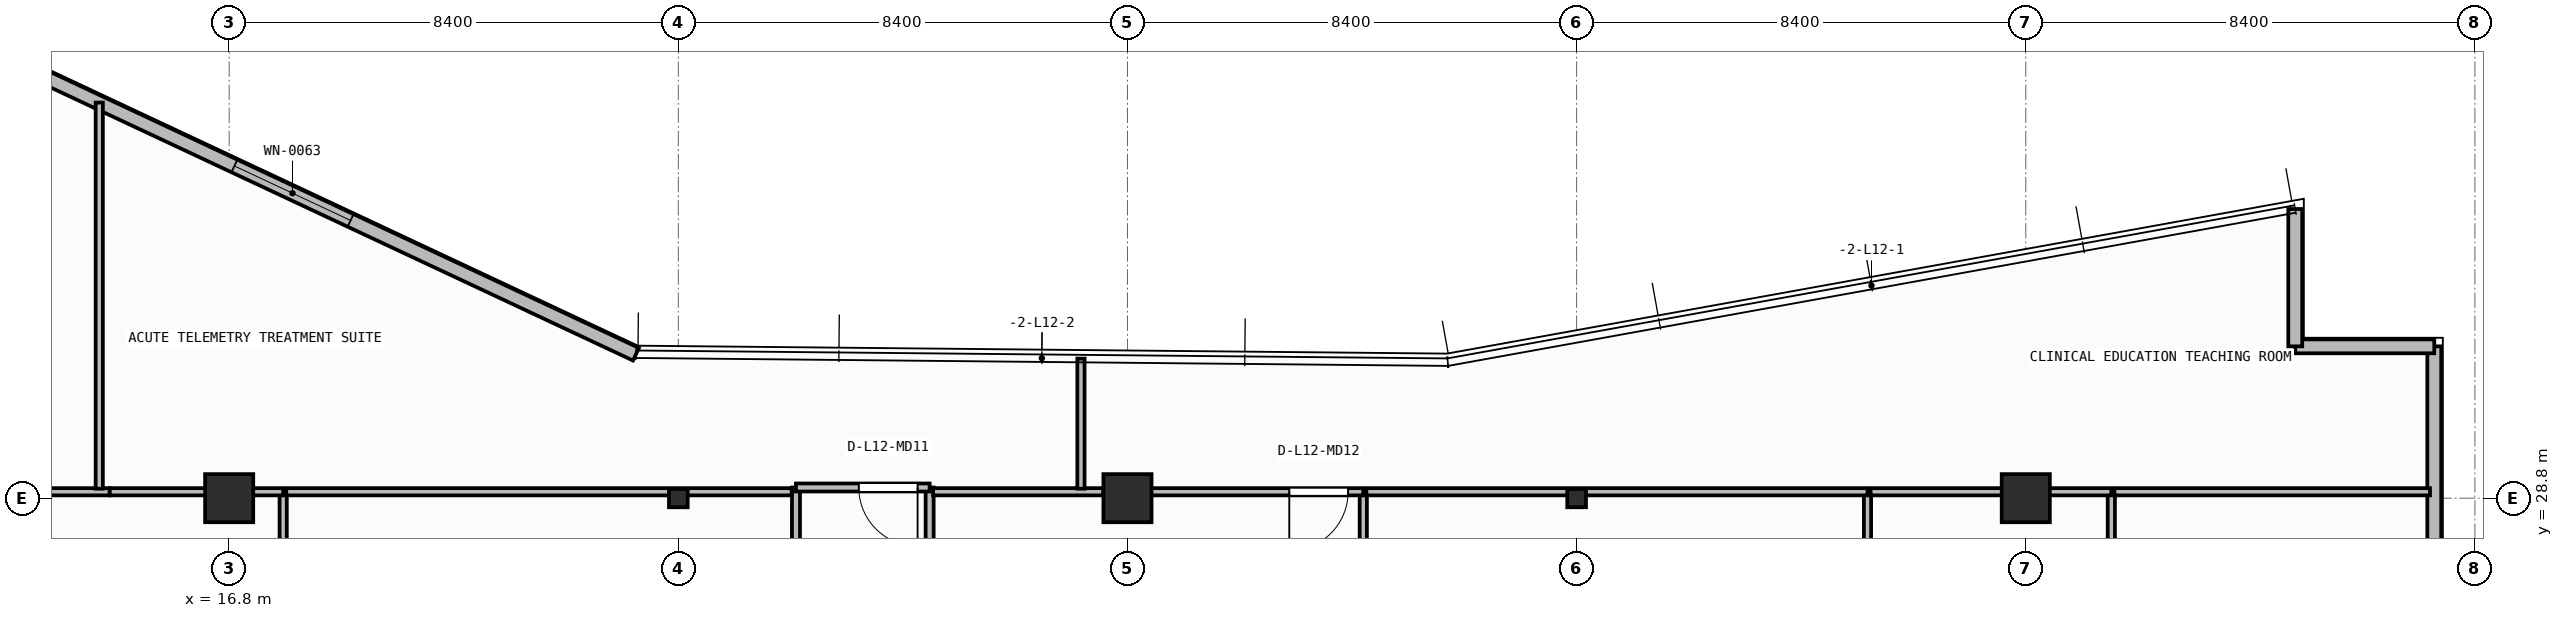
"""IFC4 building model, lengths in metres.
Left out: names, types, materials, properties, quantities, classifications, styles, units other than length and angle.
Written with IfcOpenShell. Run it as: python <this file> out.ifc"""

import sys

from ifc_helpers import new_model, si_unit, direction, frame, frame_2d, origin, origin_2d, place, context, subcontext, project, spatial, rectangle, i_section, extrude, element, fill, save


model = new_model("IFC4")
c1 = context("Model", 3, precision=1e-05, world=origin(), true_north=direction((0.0, 1.0)))
c2 = subcontext(c1, "Body", "Model", "MODEL_VIEW")
j1 = project(units=[si_unit("LENGTHUNIT", "METRE"), si_unit("PLANEANGLEUNIT", "RADIAN")], contexts=[c1])
p1 = place(None, origin())
s1 = spatial("IfcSite", under=j1, at=p1, CompositionType="ELEMENT")
p2 = place(p1, origin())
s2 = spatial("IfcBuilding", under=s1, at=p2, CompositionType="ELEMENT")
p3 = place(p2, frame((0.0, 0.0, 50.15)))
s3 = spatial("IfcBuildingStorey", under=s2, at=p3, CompositionType="ELEMENT", Elevation=50.15)
p4 = place(p3, frame((16.8, 28.8, 0.0), z_axis=(0.0, 0.0, 1.0), x_axis=(1.0, 0.0, 0.0)))
e1 = element("IfcColumn", 1, at=p4, inside=s3, PredefinedType="COLUMN", context=c2, shape_type="SweptSolid", body=[
    extrude(rectangle(XDim=0.9, YDim=0.9, at=origin_2d()), origin(), (0.0, 0.0, 1.0), 3.95),
])
p5 = place(p3, frame((25.2, 28.8, 0.0), z_axis=(0.0, 0.0, 1.0), x_axis=(1.0, 0.0, 0.0)))
e2 = element("IfcColumn", 2, at=p5, inside=s3, PredefinedType="COLUMN", context=c2, shape_type="SweptSolid", body=[
    extrude(i_section(OverallWidth=0.35, OverallDepth=0.34, WebThickness=0.016, FlangeThickness=0.028, at=origin_2d()), origin(), (0.0, 0.0, 1.0), 3.95),
])
p6 = place(p3, frame((33.6, 28.8, 0.0), z_axis=(0.0, 0.0, 1.0), x_axis=(1.0, 0.0, 0.0)))
e3 = element("IfcColumn", 3, at=p6, inside=s3, PredefinedType="COLUMN", context=c2, shape_type="SweptSolid", body=[
    extrude(rectangle(XDim=0.9, YDim=0.9, at=origin_2d()), origin(), (0.0, 0.0, 1.0), 3.95),
])
p7 = place(p3, frame((42.0, 28.8, 0.0), z_axis=(0.0, 0.0, 1.0), x_axis=(1.0, 0.0, 0.0)))
e4 = element("IfcColumn", 4, at=p7, inside=s3, PredefinedType="COLUMN", context=c2, shape_type="SweptSolid", body=[
    extrude(i_section(OverallWidth=0.35, OverallDepth=0.34, WebThickness=0.016, FlangeThickness=0.028, at=origin_2d()), origin(), (0.0, 0.0, 1.0), 3.95),
])
p8 = place(p3, frame((50.4, 28.8, 0.0), z_axis=(0.0, 0.0, 1.0), x_axis=(1.0, 0.0, 0.0)))
e5 = element("IfcColumn", 5, at=p8, inside=s3, PredefinedType="COLUMN", context=c2, shape_type="SweptSolid", body=[
    extrude(rectangle(XDim=0.9, YDim=0.9, at=origin_2d()), origin(), (0.0, 0.0, 1.0), 3.95),
])
p9 = place(p3, frame((58.04, 7.16, 0.0), z_axis=(0.0, 0.0, 1.0), x_axis=(0.0, 1.0, 0.0)))
e6 = element("IfcWall", 6, at=p9, inside=s3, PredefinedType="STANDARD", context=c2, shape_type="SweptSolid", body=[
    extrude(rectangle(XDim=24.48, YDim=0.26, at=frame_2d((12.24, 0.0))), origin(), (0.0, 0.0, 1.0), 3.71),
])
p10 = place(p9, frame((8.87, 0.0, 0.0)))
e7 = element("IfcOpeningElement", 7, at=p10, cuts=e6, PredefinedType="OPENING", context=c2, shape_type="SweptSolid", body=[
    extrude(rectangle(XDim=1.3, YDim=2.15, at=frame_2d((0.65, 1.075))), frame((0.0, 0.14, 0.0), z_axis=(0.0, -1.0, 0.0), x_axis=(1.0, 0.0, 0.0)), (0.0, 0.0, 1.0), 0.28),
])
p11 = place(p3, frame((58.04, 31.64, 0.0), z_axis=(0.0, 0.0, 1.0), x_axis=(-1.0, 0.0, 0.0)))
e8 = element("IfcWall", 8, at=p11, inside=s3, PredefinedType="STANDARD", context=c2, shape_type="SweptSolid", body=[
    extrude(rectangle(XDim=2.6, YDim=0.26, at=frame_2d((1.3, 0.0))), origin(), (0.0, 0.0, 1.0), 3.71),
])
p12 = place(p3, frame((55.44, 31.64, 0.0), z_axis=(0.0, 0.0, 1.0), x_axis=(0.0, 1.0, 0.0)))
e9 = element("IfcWall", 9, at=p12, inside=s3, PredefinedType="STANDARD", context=c2, shape_type="SweptSolid", body=[
    extrude(rectangle(XDim=2.569, YDim=0.26, at=frame_2d((1.284, 0.0))), origin(), (0.0, 0.0, 1.0), 3.71),
])
p13 = place(p3, frame((24.408, 31.492, 0.0), z_axis=(0.0, 0.0, 1.0), x_axis=(-0.905396522918, 0.424566998585, 0.0)))
e10 = element("IfcWall", 10, at=p13, inside=s3, PredefinedType="STANDARD", context=c2, shape_type="SweptSolid", body=[
    extrude(rectangle(XDim=14.189, YDim=0.26, at=frame_2d((7.095, 0.0))), origin(), (0.0, 0.0, 1.0), 3.71),
])
p14 = place(p13, frame((5.895, 0.0, 0.9)))
e11 = element("IfcOpeningElement", 11, at=p14, cuts=e10, PredefinedType="OPENING", context=c2, shape_type="SweptSolid", body=[
    extrude(rectangle(XDim=2.4, YDim=1.65, at=frame_2d((1.2, 0.825))), frame((0.0, 0.14, 0.0), z_axis=(0.0, -1.0, 0.0), x_axis=(1.0, 0.0, 0.0)), (0.0, 0.0, 1.0), 0.28),
])
p15 = place(p3, frame((27.4, 29.0, 0.0), z_axis=(0.0, 0.0, 1.0), x_axis=(0.0, -1.0, 0.0)))
e12 = element("IfcWall", 12, at=p15, inside=s3, PredefinedType="PARTITIONING", context=c2, shape_type="SweptSolid", body=[
    extrude(rectangle(XDim=9.432, YDim=0.15, at=frame_2d((4.716, 0.0))), origin(), (0.0, 0.0, 1.0), 3.71),
])
p16 = place(p15, frame((3.769, 0.0, 0.0)))
e13 = element("IfcOpeningElement", 13, at=p16, cuts=e12, PredefinedType="OPENING", context=c2, shape_type="SweptSolid", body=[
    extrude(rectangle(XDim=1.1, YDim=2.1, at=frame_2d((0.55, 1.05))), frame((0.0, 0.085, 0.0), z_axis=(0.0, -1.0, 0.0), x_axis=(1.0, 0.0, 0.0)), (0.0, 0.0, 1.0), 0.17),
])
p17 = place(p3, frame((29.9, 19.568, 0.0), z_axis=(0.0, 0.0, 1.0), x_axis=(0.0, 1.0, 0.0)))
e14 = element("IfcWall", 14, at=p17, inside=s3, PredefinedType="PARTITIONING", context=c2, shape_type="SweptSolid", body=[
    extrude(rectangle(XDim=9.432, YDim=0.15, at=frame_2d((4.716, 0.0))), origin(), (0.0, 0.0, 1.0), 3.71),
])
p18 = place(p17, frame((4.166, 0.0, 0.0)))
e15 = element("IfcOpeningElement", 15, at=p18, cuts=e14, PredefinedType="OPENING", context=c2, shape_type="SweptSolid", body=[
    extrude(rectangle(XDim=1.1, YDim=2.1, at=frame_2d((0.55, 1.05))), frame((0.0, 0.085, 0.0), z_axis=(0.0, -1.0, 0.0), x_axis=(1.0, 0.0, 0.0)), (0.0, 0.0, 1.0), 0.17),
])
p19 = place(p3, frame((29.9, 29.0, 0.0), z_axis=(0.0, 0.0, 1.0), x_axis=(-1.0, 0.0, 0.0)))
e16 = element("IfcWall", 16, at=p19, inside=s3, PredefinedType="PARTITIONING", context=c2, shape_type="SweptSolid", body=[
    extrude(rectangle(XDim=2.5, YDim=0.15, at=frame_2d((1.25, 0.0))), origin(), (0.0, 0.0, 1.0), 3.279),
])
p20 = place(p19, frame((0.225, 0.0, 0.0)))
e17 = element("IfcOpeningElement", 17, at=p20, cuts=e16, PredefinedType="OPENING", context=c2, shape_type="SweptSolid", body=[
    extrude(rectangle(XDim=1.1, YDim=2.1, at=frame_2d((0.55, 1.05))), frame((0.0, 0.085, 0.0), z_axis=(0.0, -1.0, 0.0), x_axis=(1.0, 0.0, 0.0)), (0.0, 0.0, 1.0), 0.17),
])
p21 = place(p3, frame((17.81, 19.397, 0.0), z_axis=(0.0, 0.0, 1.0), x_axis=(0.0, 1.0, 0.0)))
e18 = element("IfcWall", 18, at=p21, inside=s3, PredefinedType="PARTITIONING", context=c2, shape_type="SweptSolid", body=[
    extrude(rectangle(XDim=9.522, YDim=0.135, at=frame_2d((4.761, 0.0))), origin(), (0.0, 0.0, 1.0), 3.71),
])
p22 = place(p3, frame((14.565, 28.92, 0.0), z_axis=(0.0, 0.0, 1.0), x_axis=(-1.0, 0.0, 0.0)))
e19 = element("IfcWall", 19, at=p22, inside=s3, PredefinedType="PARTITIONING", context=c2, shape_type="SweptSolid", body=[
    extrude(rectangle(XDim=2.877, YDim=0.135, at=frame_2d((1.438, 0.0))), origin(), (0.0, 0.0, 1.0), 3.073),
])
p23 = place(p3, frame((17.81, 28.92, 0.0), z_axis=(0.0, 0.0, 1.0), x_axis=(-1.0, 0.0, 0.0)))
e20 = element("IfcWall", 20, at=p23, inside=s3, PredefinedType="PARTITIONING", context=c2, shape_type="SweptSolid", body=[
    extrude(rectangle(XDim=3.243, YDim=0.135, at=frame_2d((1.622, 0.0))), origin(), (0.0, 0.0, 1.0), 3.073),
])
p24 = place(p3, frame((27.32, 28.92, 0.0), z_axis=(0.0, 0.0, 1.0), x_axis=(-1.0, 0.0, 0.0)))
e21 = element("IfcWall", 21, at=p24, inside=s3, PredefinedType="PARTITIONING", context=c2, shape_type="SweptSolid", body=[
    extrude(rectangle(XDim=9.453, YDim=0.135, at=frame_2d((4.726, 0.0))), origin(), (0.0, 0.0, 1.0), 3.073),
])
p25 = place(p3, frame((38.01, 19.397, 0.0), z_axis=(0.0, 0.0, 1.0), x_axis=(0.0, 1.0, 0.0)))
e22 = element("IfcWall", 22, at=p25, inside=s3, PredefinedType="PARTITIONING", context=c2, shape_type="SweptSolid", body=[
    extrude(rectangle(XDim=9.522, YDim=0.135, at=frame_2d((4.761, 0.0))), origin(), (0.0, 0.0, 1.0), 3.71),
])
p26 = place(p25, frame((4.211, 0.0, 0.0)))
e23 = element("IfcOpeningElement", 23, at=p26, cuts=e22, PredefinedType="OPENING", context=c2, shape_type="SweptSolid", body=[
    extrude(rectangle(XDim=1.1, YDim=2.1, at=frame_2d((0.55, 1.05))), frame((0.0, 0.077, 0.0), z_axis=(0.0, -1.0, 0.0), x_axis=(1.0, 0.0, 0.0)), (0.0, 0.0, 1.0), 0.155),
])
p27 = place(p3, frame((33.15, 28.92, 0.0), z_axis=(0.0, 0.0, 1.0), x_axis=(-1.0, 0.0, 0.0)))
e24 = element("IfcWall", 24, at=p27, inside=s3, PredefinedType="PARTITIONING", context=c2, shape_type="SweptSolid", body=[
    extrude(rectangle(XDim=3.185, YDim=0.135, at=frame_2d((1.592, 0.0))), origin(), (0.0, 0.0, 1.0), 3.279),
])
p28 = place(p3, frame((38.01, 28.92, 0.0), z_axis=(0.0, 0.0, 1.0), x_axis=(-1.0, 0.0, 0.0)))
e25 = element("IfcWall", 25, at=p28, inside=s3, PredefinedType="PARTITIONING", context=c2, shape_type="SweptSolid", body=[
    extrude(rectangle(XDim=4.858, YDim=0.135, at=frame_2d((2.429, 0.0))), origin(), (0.0, 0.0, 1.0), 3.279),
])
p29 = place(p28, frame((0.284, 0.0, 0.0)))
e26 = element("IfcOpeningElement", 26, at=p29, cuts=e25, PredefinedType="OPENING", context=c2, shape_type="SweptSolid", body=[
    extrude(rectangle(XDim=1.1, YDim=2.1, at=frame_2d((0.55, 1.05))), frame((0.0, 0.077, 0.0), z_axis=(0.0, -1.0, 0.0), x_axis=(1.0, 0.0, 0.0)), (0.0, 0.0, 1.0), 0.155),
])
p30 = place(p3, frame((47.44, 19.397, 0.0), z_axis=(0.0, 0.0, 1.0), x_axis=(0.0, 1.0, 0.0)))
e27 = element("IfcWall", 27, at=p30, inside=s3, PredefinedType="PARTITIONING", context=c2, shape_type="SweptSolid", body=[
    extrude(rectangle(XDim=9.522, YDim=0.135, at=frame_2d((4.761, 0.0))), origin(), (0.0, 0.0, 1.0), 3.71),
])
p31 = place(p30, frame((4.211, 0.0, 0.0)))
e28 = element("IfcOpeningElement", 28, at=p31, cuts=e27, PredefinedType="OPENING", context=c2, shape_type="SweptSolid", body=[
    extrude(rectangle(XDim=1.1, YDim=2.1, at=frame_2d((0.55, 1.05))), frame((0.0, 0.077, 0.0), z_axis=(0.0, -1.0, 0.0), x_axis=(1.0, 0.0, 0.0)), (0.0, 0.0, 1.0), 0.155),
])
p32 = place(p3, frame((47.44, 28.92, 0.0), z_axis=(0.0, 0.0, 1.0), x_axis=(-1.0, 0.0, 0.0)))
e29 = element("IfcWall", 29, at=p32, inside=s3, PredefinedType="PARTITIONING", context=c2, shape_type="SweptSolid", body=[
    extrude(rectangle(XDim=9.373, YDim=0.135, at=frame_2d((4.686, 0.0))), origin(), (0.0, 0.0, 1.0), 3.073),
])
p33 = place(p3, frame((52.0, 19.397, 0.0), z_axis=(0.0, 0.0, 1.0), x_axis=(0.0, 1.0, 0.0)))
e30 = element("IfcWall", 30, at=p33, inside=s3, PredefinedType="PARTITIONING", context=c2, shape_type="SweptSolid", body=[
    extrude(rectangle(XDim=9.522, YDim=0.135, at=frame_2d((4.761, 0.0))), origin(), (0.0, 0.0, 1.0), 3.71),
])
p34 = place(p33, frame((4.612, 0.0, 0.0)))
e31 = element("IfcOpeningElement", 31, at=p34, cuts=e30, PredefinedType="OPENING", context=c2, shape_type="SweptSolid", body=[
    extrude(rectangle(XDim=1.1, YDim=2.1, at=frame_2d((0.55, 1.05))), frame((0.0, 0.077, 0.0), z_axis=(0.0, -1.0, 0.0), x_axis=(1.0, 0.0, 0.0)), (0.0, 0.0, 1.0), 0.155),
])
p35 = place(p3, frame((52.0, 28.92, 0.0), z_axis=(0.0, 0.0, 1.0), x_axis=(-1.0, 0.0, 0.0)))
e32 = element("IfcWall", 32, at=p35, inside=s3, PredefinedType="PARTITIONING", context=c2, shape_type="SweptSolid", body=[
    extrude(rectangle(XDim=4.502, YDim=0.135, at=frame_2d((2.251, 0.0))), origin(), (0.0, 0.0, 1.0), 3.073),
])
p36 = place(p3, frame((57.96, 28.92, 0.0), z_axis=(0.0, 0.0, 1.0), x_axis=(-1.0, 0.0, 0.0)))
e33 = element("IfcWall", 33, at=p36, inside=s3, PredefinedType="PARTITIONING", context=c2, shape_type="SweptSolid", body=[
    extrude(rectangle(XDim=5.902, YDim=0.135, at=frame_2d((2.951, 0.0))), origin(), (0.0, 0.0, 1.0), 3.71),
])
p37 = place(p3, frame((14.37, 28.978, 0.0), z_axis=(0.0, 0.0, 1.0), x_axis=(0.0, 1.0, 0.0)))
e34 = element("IfcWall", 34, at=p37, inside=s3, PredefinedType="PARTITIONING", context=c2, shape_type="SweptSolid", body=[
    extrude(rectangle(XDim=7.222, YDim=0.135, at=frame_2d((3.611, 0.0))), origin(), (0.0, 0.0, 1.0), 3.71),
])
p38 = place(p3, frame((32.73, 28.978, 0.0), z_axis=(0.0, 0.0, 1.0), x_axis=(0.0, 1.0, 0.0)))
e35 = element("IfcWall", 35, at=p38, inside=s3, PredefinedType="PARTITIONING", context=c2, shape_type="SweptSolid", body=[
    extrude(rectangle(XDim=2.433, YDim=0.135, at=frame_2d((1.217, 0.0))), origin(), (0.0, 0.0, 1.0), 3.71),
])
p39 = place(p14, origin())
e36 = element("IfcWindow", 36, at=p39, inside=s3, PartitioningType="SINGLE_PANEL", PredefinedType="WINDOW", context=c2, shape_type="SweptSolid", body=[
    extrude(rectangle(XDim=2.4, YDim=1.65, at=frame_2d((1.2, 0.825))), frame((0.0, 0.03, 0.0), z_axis=(0.0, -1.0, 0.0), x_axis=(1.0, 0.0, 0.0)), (0.0, 0.0, 1.0), 0.06),
])
fill(e11, e36)
p40 = place(p20, origin())
e37 = element("IfcDoor", 37, at=p40, inside=s3, OperationType="SINGLE_SWING_LEFT", PredefinedType="DOOR", context=c2, shape_type="SweptSolid", body=[
    extrude(rectangle(XDim=1.1, YDim=2.1, at=frame_2d((0.55, 1.05))), frame((0.0, 0.025, 0.0), z_axis=(0.0, -1.0, 0.0), x_axis=(1.0, 0.0, 0.0)), (0.0, 0.0, 1.0), 0.05),
])
fill(e17, e37)
p41 = place(p29, origin())
e38 = element("IfcDoor", 38, at=p41, inside=s3, OperationType="SINGLE_SWING_RIGHT", PredefinedType="DOOR", context=c2, shape_type="SweptSolid", body=[
    extrude(rectangle(XDim=1.1, YDim=2.1, at=frame_2d((0.55, 1.05))), frame((0.0, 0.025, 0.0), z_axis=(0.0, -1.0, 0.0), x_axis=(1.0, 0.0, 0.0)), (0.0, 0.0, 1.0), 0.05),
])
fill(e26, e38)
save(model, sys.argv[1])
